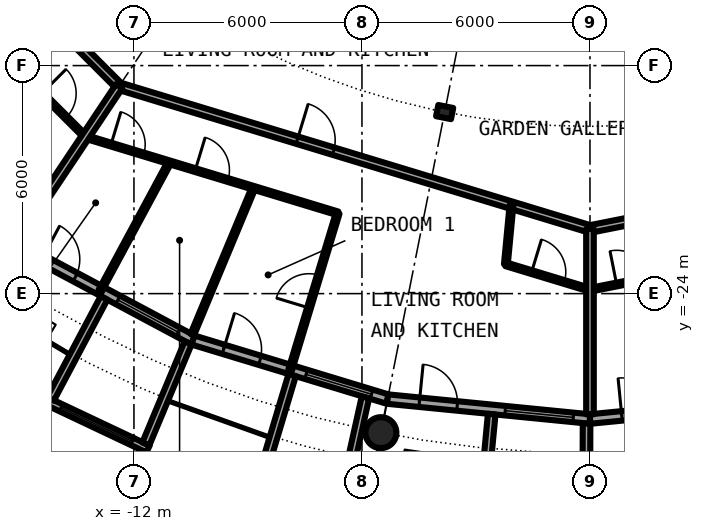
"""IFC4 building model, lengths in metres.
Left out: names, types, materials, properties, quantities, classifications, styles, units other than length and angle.
Written with IfcOpenShell. Run it as: python <this file> out.ifc"""

import sys

from ifc_helpers import new_model, si_unit, direction, frame, frame_2d, origin, origin_2d, place, context, subcontext, project, spatial, rectangle, circle, hollow_circle, i_section, extrude, element, fill, save


model = new_model("IFC4")
c1 = context("Model", 3, precision=1e-05, world=origin(), true_north=direction((0.0, 1.0)))
c2 = subcontext(c1, "Body", "Model", "MODEL_VIEW")
j1 = project(units=[si_unit("LENGTHUNIT", "METRE"), si_unit("PLANEANGLEUNIT", "RADIAN")], contexts=[c1])
p1 = place(None, origin())
s1 = spatial("IfcSite", under=j1, at=p1, CompositionType="ELEMENT")
p2 = place(p1, origin())
s2 = spatial("IfcBuilding", under=s1, at=p2, CompositionType="ELEMENT")
p3 = place(p2, frame((0.0, 0.0, 196.3)))
s3 = spatial("IfcBuildingStorey", under=s2, at=p3, CompositionType="ELEMENT", Elevation=196.3)
p4 = place(p3, frame((-5.501, -27.658, 0.0), z_axis=(0.0, 0.0, 1.0), x_axis=(1.0, 0.0, 0.0)))
e1 = element("IfcColumn", 1, at=p4, inside=s3, PredefinedType="COLUMN", context=c2, shape_type="SweptSolid", body=[
    extrude(hollow_circle(Radius=0.406, WallThickness=0.03, at=origin_2d()), origin(), (0.0, 0.0, 1.0), 3.05),
])
p5 = place(p3, frame((-3.824, -19.223, 0.0), z_axis=(0.0, 0.0, 1.0), x_axis=(-0.195090322016, -0.980785280403, 0.0)))
e2 = element("IfcColumn", 2, at=p5, inside=s3, PredefinedType="COLUMN", context=c2, shape_type="SweptSolid", body=[
    extrude(i_section(OverallWidth=0.3, OverallDepth=0.4, WebThickness=0.013, FlangeThickness=0.024, FilletRadius=0.027, at=origin_2d()), origin(), (0.0, 0.0, 1.0), 3.05),
])
p6 = place(p3, frame((-15.167, -22.699, 0.0), z_axis=(0.0, 0.0, 1.0), x_axis=(0.881915646801, -0.471407246368, 0.0)))
e3 = element("IfcWall", 3, at=p6, inside=s3, PredefinedType="SOLIDWALL", context=c2, shape_type="SweptSolid", body=[
    extrude(rectangle(XDim=5.352, YDim=0.25, at=frame_2d((2.676, 0.0))), origin(), (0.0, 0.0, 1.0), 2.7),
])
p7 = place(p6, frame((0.841, 0.0, 0.0)))
e4 = element("IfcOpeningElement", 4, at=p7, cuts=e3, PredefinedType="OPENING", context=c2, shape_type="SweptSolid", body=[
    extrude(rectangle(XDim=1.0, YDim=2.2, at=frame_2d((0.5, 1.1))), frame((0.0, 0.135, 0.0), z_axis=(0.0, -1.0, 0.0), x_axis=(1.0, 0.0, 0.0)), (0.0, 0.0, 1.0), 0.27),
])
p8 = place(p6, frame((3.111, 0.0, 0.3)))
e5 = element("IfcOpeningElement", 5, at=p8, cuts=e3, PredefinedType="OPENING", context=c2, shape_type="SweptSolid", body=[
    extrude(rectangle(XDim=1.8, YDim=2.1, at=frame_2d((0.9, 1.05))), frame((0.0, 0.135, 0.0), z_axis=(0.0, -1.0, 0.0), x_axis=(1.0, 0.0, 0.0)), (0.0, 0.0, 1.0), 0.27),
])
p9 = place(p3, frame((-14.335, -26.808, -0.03), z_axis=(0.0, 0.0, 1.0), x_axis=(0.904000060331, -0.427532327342, 0.0)))
e6 = element("IfcWall", 6, at=p9, inside=s3, PredefinedType="SOLIDWALL", context=c2, shape_type="SweptSolid", body=[
    extrude(rectangle(XDim=2.993, YDim=0.2, at=frame_2d((1.497, 0.0))), origin(), (0.0, 0.0, 1.0), 2.73),
])
p10 = place(p9, frame((0.457, 0.0, 0.33)))
e7 = element("IfcOpeningElement", 7, at=p10, cuts=e6, PredefinedType="OPENING", context=c2, shape_type="SweptSolid", body=[
    extrude(circle(Radius=1.04, at=frame_2d((1.04, 1.04))), frame((0.0, 0.11, 0.0), z_axis=(0.0, -1.0, 0.0), x_axis=(1.0, 0.0, 0.0)), (0.0, 0.0, 1.0), 0.22),
])
p11 = place(p3, frame((-12.787, -24.113, -0.03), z_axis=(0.0, 0.0, 1.0), x_axis=(-0.468365282436, -0.883534924159, 0.0)))
e8 = element("IfcWall", 8, at=p11, inside=s3, PredefinedType="SOLIDWALL", context=c2, shape_type="SweptSolid", body=[
    extrude(rectangle(XDim=3.006, YDim=0.2, at=frame_2d((1.503, 0.0))), origin(), (0.0, 0.0, 1.0), 2.73),
])
p12 = place(p3, frame((-10.575, -25.295, -0.03), z_axis=(0.0, 0.0, 1.0), x_axis=(-0.385697364644, -0.922625353492, 0.0)))
e9 = element("IfcWall", 9, at=p12, inside=s3, PredefinedType="SOLIDWALL", context=c2, shape_type="SweptSolid", body=[
    extrude(rectangle(XDim=2.883, YDim=0.2, at=frame_2d((1.442, 0.0))), origin(), (0.0, 0.0, 1.0), 2.73),
])
p13 = place(p3, frame((-10.447, -25.222, 0.0), z_axis=(0.0, 0.0, 1.0), x_axis=(0.956965678721, -0.290201119486, 0.0)))
e10 = element("IfcWall", 10, at=p13, inside=s3, PredefinedType="SOLIDWALL", context=c2, shape_type="SweptSolid", body=[
    extrude(rectangle(XDim=5.351, YDim=0.25, at=frame_2d((2.676, 0.0))), origin(), (0.0, 0.0, 1.0), 2.7),
])
p14 = place(p13, frame((0.841, 0.0, 0.0)))
e11 = element("IfcOpeningElement", 11, at=p14, cuts=e10, PredefinedType="OPENING", context=c2, shape_type="SweptSolid", body=[
    extrude(rectangle(XDim=1.0, YDim=2.2, at=frame_2d((0.5, 1.1))), frame((0.0, 0.135, 0.0), z_axis=(0.0, -1.0, 0.0), x_axis=(1.0, 0.0, 0.0)), (0.0, 0.0, 1.0), 0.27),
])
p15 = place(p13, frame((3.111, 0.0, 0.3)))
e12 = element("IfcOpeningElement", 12, at=p15, cuts=e10, PredefinedType="OPENING", context=c2, shape_type="SweptSolid", body=[
    extrude(rectangle(XDim=1.8, YDim=2.1, at=frame_2d((0.9, 1.05))), frame((0.0, 0.135, 0.0), z_axis=(0.0, -1.0, 0.0), x_axis=(1.0, 0.0, 0.0)), (0.0, 0.0, 1.0), 0.27),
])
p16 = place(p3, frame((-7.837, -26.144, -0.03), z_axis=(0.0, 0.0, 1.0), x_axis=(-0.287064767992, -0.957911174889, 0.0)))
e13 = element("IfcWall", 13, at=p16, inside=s3, PredefinedType="SOLIDWALL", context=c2, shape_type="SweptSolid", body=[
    extrude(rectangle(XDim=3.006, YDim=0.2, at=frame_2d((1.503, 0.0))), origin(), (0.0, 0.0, 1.0), 2.73),
])
p17 = place(p3, frame((-5.909, -26.729, -0.03), z_axis=(0.0, 0.0, 1.0), x_axis=(-0.216409053917, -0.976302781612, 0.0)))
e14 = element("IfcWall", 14, at=p17, inside=s3, PredefinedType="SOLIDWALL", context=c2, shape_type="SweptSolid", body=[
    extrude(rectangle(XDim=2.925, YDim=0.2, at=frame_2d((1.463, 0.0))), origin(), (0.0, 0.0, 1.0), 2.73),
])
p18 = place(p3, frame((-5.326, -26.775, 0.0), z_axis=(0.0, 0.0, 1.0), x_axis=(0.995173996315, -0.098126026407, 0.0)))
e15 = element("IfcWall", 15, at=p18, inside=s3, PredefinedType="SOLIDWALL", context=c2, shape_type="SweptSolid", body=[
    extrude(rectangle(XDim=5.352, YDim=0.25, at=frame_2d((2.676, 0.0))), origin(), (0.0, 0.0, 1.0), 2.7),
])
p19 = place(p18, frame((0.841, 0.0, 0.0)))
e16 = element("IfcOpeningElement", 16, at=p19, cuts=e15, PredefinedType="OPENING", context=c2, shape_type="SweptSolid", body=[
    extrude(rectangle(XDim=1.0, YDim=2.2, at=frame_2d((0.5, 1.1))), frame((0.0, 0.135, 0.0), z_axis=(0.0, -1.0, 0.0), x_axis=(1.0, 0.0, 0.0)), (0.0, 0.0, 1.0), 0.27),
])
p20 = place(p18, frame((3.111, 0.0, 0.3)))
e17 = element("IfcOpeningElement", 17, at=p20, cuts=e15, PredefinedType="OPENING", context=c2, shape_type="SweptSolid", body=[
    extrude(rectangle(XDim=1.8, YDim=2.1, at=frame_2d((0.9, 1.05))), frame((0.0, 0.135, 0.0), z_axis=(0.0, -1.0, 0.0), x_axis=(1.0, 0.0, 0.0)), (0.0, 0.0, 1.0), 0.27),
])
p21 = place(p3, frame((-2.586, -27.171, -0.03), z_axis=(0.0, 0.0, 1.0), x_axis=(-0.094548432284, -0.995520262954, 0.0)))
e18 = element("IfcWall", 18, at=p21, inside=s3, PredefinedType="SOLIDWALL", context=c2, shape_type="SweptSolid", body=[
    extrude(rectangle(XDim=3.006, YDim=0.2, at=frame_2d((1.503, 0.0))), origin(), (0.0, 0.0, 1.0), 2.73),
])
p22 = place(p3, frame((-0.09, -27.417, -0.03), z_axis=(0.0, 0.0, 1.0), x_axis=(-0.00347308367, -0.999993968827, 0.0)))
e19 = element("IfcWall", 19, at=p22, inside=s3, PredefinedType="SOLIDWALL", context=c2, shape_type="SweptSolid", body=[
    extrude(rectangle(XDim=2.882, YDim=0.2, at=frame_2d((1.441, 0.0))), origin(), (0.0, 0.0, 1.0), 2.73),
])
p23 = place(p3, frame((0.0, -27.3, 0.0), z_axis=(0.0, 0.0, 1.0), x_axis=(0.995173996315, 0.098126026407, 0.0)))
e20 = element("IfcWall", 20, at=p23, inside=s3, PredefinedType="SOLIDWALL", context=c2, shape_type="SweptSolid", body=[
    extrude(rectangle(XDim=5.352, YDim=0.25, at=frame_2d((2.676, 0.0))), origin(), (0.0, 0.0, 1.0), 2.7),
])
p24 = place(p23, frame((0.841, 0.0, 0.0)))
e21 = element("IfcOpeningElement", 21, at=p24, cuts=e20, PredefinedType="OPENING", context=c2, shape_type="SweptSolid", body=[
    extrude(rectangle(XDim=1.0, YDim=2.2, at=frame_2d((0.5, 1.1))), frame((0.0, 0.135, 0.0), z_axis=(0.0, -1.0, 0.0), x_axis=(1.0, 0.0, 0.0)), (0.0, 0.0, 1.0), 0.27),
])
p25 = place(p23, frame((3.111, 0.0, 0.3)))
e22 = element("IfcOpeningElement", 22, at=p25, cuts=e20, PredefinedType="OPENING", context=c2, shape_type="SweptSolid", body=[
    extrude(rectangle(XDim=1.8, YDim=2.1, at=frame_2d((0.9, 1.05))), frame((0.0, 0.135, 0.0), z_axis=(0.0, -1.0, 0.0), x_axis=(1.0, 0.0, 0.0)), (0.0, 0.0, 1.0), 0.27),
])
p26 = place(p3, frame((-14.927, -18.224, 0.0), z_axis=(0.0, 0.0, 1.0), x_axis=(0.707316201218, -0.706897299114, 0.0)))
e23 = element("IfcWall", 23, at=p26, inside=s3, PredefinedType="PARTITIONING", context=c2, shape_type="SweptSolid", body=[
    extrude(rectangle(XDim=2.331, YDim=0.1, at=frame_2d((1.166, 0.0))), origin(), (0.0, 0.0, 1.0), 2.7),
])
p27 = place(p26, frame((0.716, 0.0, 0.0)))
e24 = element("IfcOpeningElement", 24, at=p27, cuts=e23, PredefinedType="OPENING", context=c2, shape_type="SweptSolid", body=[
    extrude(rectangle(XDim=0.9, YDim=2.3, at=frame_2d((0.45, 1.15))), frame((0.0, 0.06, 0.0), z_axis=(0.0, -1.0, 0.0), x_axis=(1.0, 0.0, 0.0)), (0.0, 0.0, 1.0), 0.12),
])
p28 = place(p3, frame((0.0, -23.9, 0.0), z_axis=(0.0, 0.0, 1.0), x_axis=(0.98079351414, 0.19504892366, 0.0)))
e25 = element("IfcWall", 25, at=p28, inside=s3, PredefinedType="PARTITIONING", context=c2, shape_type="SweptSolid", body=[
    extrude(rectangle(XDim=2.332, YDim=0.1, at=frame_2d((1.166, 0.0))), origin(), (0.0, 0.0, 1.0), 2.7),
])
p29 = place(p28, frame((0.716, 0.0, 0.0)))
e26 = element("IfcOpeningElement", 26, at=p29, cuts=e25, PredefinedType="OPENING", context=c2, shape_type="SweptSolid", body=[
    extrude(rectangle(XDim=0.9, YDim=2.3, at=frame_2d((0.45, 1.15))), frame((0.0, 0.06, 0.0), z_axis=(0.0, -1.0, 0.0), x_axis=(1.0, 0.0, 0.0)), (0.0, 0.0, 1.0), 0.12),
])
p30 = place(p3, frame((-13.279, -19.874, 0.0), z_axis=(0.0, 0.0, 1.0), x_axis=(0.956989789119, -0.290121601266, 0.0)))
e27 = element("IfcWall", 27, at=p30, inside=s3, PredefinedType="PARTITIONING", context=c2, shape_type="SweptSolid", body=[
    extrude(rectangle(XDim=6.942, YDim=0.1, at=frame_2d((3.471, 0.0))), origin(), (0.0, 0.0, 1.0), 2.7),
])
p31 = place(p30, frame((3.022, 0.0, 0.0)))
e28 = element("IfcOpeningElement", 28, at=p31, cuts=e27, PredefinedType="OPENING", context=c2, shape_type="SweptSolid", body=[
    extrude(rectangle(XDim=0.9, YDim=2.3, at=frame_2d((0.45, 1.15))), frame((0.0, 0.06, 0.0), z_axis=(0.0, -1.0, 0.0), x_axis=(1.0, 0.0, 0.0)), (0.0, 0.0, 1.0), 0.12),
])
p32 = place(p30, frame((0.705, 0.0, 0.0)))
e29 = element("IfcOpeningElement", 29, at=p32, cuts=e27, PredefinedType="OPENING", context=c2, shape_type="SweptSolid", body=[
    extrude(rectangle(XDim=0.9, YDim=2.3, at=frame_2d((0.45, 1.15))), frame((0.0, 0.06, 0.0), z_axis=(0.0, -1.0, 0.0), x_axis=(1.0, 0.0, 0.0)), (0.0, 0.0, 1.0), 0.12),
])
p33 = place(p3, frame((-2.213, -23.229, 0.0), z_axis=(0.0, 0.0, 1.0), x_axis=(0.957056340114, -0.289901986622, 0.0)))
e30 = element("IfcWall", 30, at=p33, inside=s3, PredefinedType="PARTITIONING", context=c2, shape_type="SweptSolid", body=[
    extrude(rectangle(XDim=2.314, YDim=0.1, at=frame_2d((1.157, 0.0))), origin(), (0.0, 0.0, 1.0), 2.7),
])
p34 = place(p33, frame((0.707, 0.0, 0.0)))
e31 = element("IfcOpeningElement", 31, at=p34, cuts=e30, PredefinedType="OPENING", context=c2, shape_type="SweptSolid", body=[
    extrude(rectangle(XDim=0.9, YDim=2.3, at=frame_2d((0.45, 1.15))), frame((0.0, 0.06, 0.0), z_axis=(0.0, -1.0, 0.0), x_axis=(1.0, 0.0, 0.0)), (0.0, 0.0, 1.0), 0.12),
])
p35 = place(p3, frame((-18.542, -12.389, 0.0), z_axis=(0.0, 0.0, 1.0), x_axis=(0.707106781187, -0.707106781187, 0.0)))
e32 = element("IfcWall", 32, at=p35, inside=s3, PredefinedType="PARTITIONING", context=c2, shape_type="SweptSolid", body=[
    extrude(rectangle(XDim=8.702, YDim=0.2, at=frame_2d((4.351, 0.0))), origin(), (0.0, 0.0, 1.0), 2.7),
])
p36 = place(p35, frame((2.763, 0.0, 0.0)))
e33 = element("IfcOpeningElement", 33, at=p36, cuts=e32, PredefinedType="OPENING", context=c2, shape_type="SweptSolid", body=[
    extrude(rectangle(XDim=1.0, YDim=2.3, at=frame_2d((0.5, 1.15))), frame((0.0, 0.11, 0.0), z_axis=(0.0, -1.0, 0.0), x_axis=(1.0, 0.0, 0.0)), (0.0, 0.0, 1.0), 0.22),
])
p37 = place(p3, frame((0.0, -22.3, 0.0), z_axis=(0.0, 0.0, 1.0), x_axis=(0.980813117615, 0.194950322682, 0.0)))
e34 = element("IfcWall", 34, at=p37, inside=s3, PredefinedType="PARTITIONING", context=c2, shape_type="SweptSolid", body=[
    extrude(rectangle(XDim=8.7, YDim=0.2, at=frame_2d((4.35, 0.0))), origin(), (0.0, 0.0, 1.0), 2.7),
])
p38 = place(p37, frame((4.938, 0.0, 0.0)))
e35 = element("IfcOpeningElement", 35, at=p38, cuts=e34, PredefinedType="OPENING", context=c2, shape_type="SweptSolid", body=[
    extrude(rectangle(XDim=1.0, YDim=2.3, at=frame_2d((0.5, 1.15))), frame((0.0, 0.11, 0.0), z_axis=(0.0, -1.0, 0.0), x_axis=(1.0, 0.0, 0.0)), (0.0, 0.0, 1.0), 0.22),
])
p39 = place(p3, frame((-12.389, -18.542, 0.0), z_axis=(0.0, 0.0, 1.0), x_axis=(0.956942051091, -0.290279022415, 0.0)))
e36 = element("IfcWall", 36, at=p39, inside=s3, PredefinedType="PARTITIONING", context=c2, shape_type="SweptSolid", body=[
    extrude(rectangle(XDim=12.946, YDim=0.2, at=frame_2d((6.473, 0.0))), origin(), (0.0, 0.0, 1.0), 2.7),
])
p40 = place(p39, frame((4.895, 0.0, 0.0)))
e37 = element("IfcOpeningElement", 37, at=p40, cuts=e36, PredefinedType="OPENING", context=c2, shape_type="SweptSolid", body=[
    extrude(rectangle(XDim=1.0, YDim=2.3, at=frame_2d((0.5, 1.15))), frame((0.0, 0.11, 0.0), z_axis=(0.0, -1.0, 0.0), x_axis=(1.0, 0.0, 0.0)), (0.0, 0.0, 1.0), 0.22),
])
p41 = place(p3, frame((-14.927, -18.224, 0.0), z_axis=(0.0, 0.0, 1.0), x_axis=(0.633861186344, 0.773446828454, 0.0)))
e38 = element("IfcWall", 38, at=p41, inside=s3, PredefinedType="PARTITIONING", context=c2, shape_type="SweptSolid", body=[
    extrude(rectangle(XDim=1.578, YDim=0.1, at=frame_2d((0.789, 0.0))), origin(), (0.0, 0.0, 1.0), 2.7),
])
p42 = place(p3, frame((-15.096, -22.596, 0.0), z_axis=(0.0, 0.0, 1.0), x_axis=(0.55555521993, 0.831479643532, 0.0)))
e39 = element("IfcWall", 39, at=p42, inside=s3, PredefinedType="PARTITIONING", context=c2, shape_type="SweptSolid", body=[
    extrude(rectangle(XDim=4.875, YDim=0.2, at=frame_2d((2.437, 0.0))), origin(), (0.0, 0.0, 1.0), 2.7),
])
p43 = place(p3, frame((-12.887, -23.925, 0.0), z_axis=(0.0, 0.0, 1.0), x_axis=(0.474281720599, 0.88037313084, 0.0)))
e40 = element("IfcWall", 40, at=p43, inside=s3, PredefinedType="PARTITIONING", context=c2, shape_type="SweptSolid", body=[
    extrude(rectangle(XDim=3.842, YDim=0.1, at=frame_2d((1.921, 0.0))), origin(), (0.0, 0.0, 1.0), 2.7),
])
p44 = place(p3, frame((-10.465, -25.079, 0.0), z_axis=(0.0, 0.0, 1.0), x_axis=(0.385232176411, 0.922819684585, 0.0)))
e41 = element("IfcWall", 41, at=p44, inside=s3, PredefinedType="PARTITIONING", context=c2, shape_type="SweptSolid", body=[
    extrude(rectangle(XDim=4.187, YDim=0.1, at=frame_2d((2.094, 0.0))), origin(), (0.0, 0.0, 1.0), 2.7),
])
p45 = place(p3, frame((-7.888, -26.005, 0.0), z_axis=(0.0, 0.0, 1.0), x_axis=(0.290193157742, 0.956968093094, 0.0)))
e42 = element("IfcWall", 42, at=p45, inside=s3, PredefinedType="PARTITIONING", context=c2, shape_type="SweptSolid", body=[
    extrude(rectangle(XDim=4.304, YDim=0.1, at=frame_2d((2.152, 0.0))), origin(), (0.0, 0.0, 1.0), 2.7),
])
p46 = place(p45, frame((1.702, 0.0, 0.0)))
e43 = element("IfcOpeningElement", 43, at=p46, cuts=e42, PredefinedType="OPENING", context=c2, shape_type="SweptSolid", body=[
    extrude(rectangle(XDim=0.9, YDim=2.3, at=frame_2d((0.45, 1.15))), frame((0.0, 0.06, 0.0), z_axis=(0.0, -1.0, 0.0), x_axis=(1.0, 0.0, 0.0)), (0.0, 0.0, 1.0), 0.12),
])
p47 = place(p3, frame((-2.213, -23.229, 0.0), z_axis=(0.0, 0.0, 1.0), x_axis=(0.094720578196, 0.995503898569, 0.0)))
e44 = element("IfcWall", 44, at=p47, inside=s3, PredefinedType="PARTITIONING", context=c2, shape_type="SweptSolid", body=[
    extrude(rectangle(XDim=1.562, YDim=0.1, at=frame_2d((0.781, 0.0))), origin(), (0.0, 0.0, 1.0), 2.7),
])
p48 = place(p3, frame((0.0, -27.175, 0.0), z_axis=(0.0, 0.0, 1.0), x_axis=(0.0, 1.0, 0.0)))
e45 = element("IfcWall", 45, at=p48, inside=s3, PredefinedType="PARTITIONING", context=c2, shape_type="SweptSolid", body=[
    extrude(rectangle(XDim=4.875, YDim=0.2, at=frame_2d((2.438, 0.0))), origin(), (0.0, 0.0, 1.0), 2.7),
])
p49 = place(p7, origin())
e46 = element("IfcDoor", 46, at=p49, inside=s3, OperationType="SINGLE_SWING_LEFT", PredefinedType="DOOR", context=c2, shape_type="SweptSolid", body=[
    extrude(rectangle(XDim=1.0, YDim=2.2, at=frame_2d((0.5, 1.1))), frame((0.0, 0.025, 0.0), z_axis=(0.0, -1.0, 0.0), x_axis=(1.0, 0.0, 0.0)), (0.0, 0.0, 1.0), 0.05),
])
fill(e4, e46)
p50 = place(p8, origin())
e47 = element("IfcWindow", 47, at=p50, inside=s3, PartitioningType="SINGLE_PANEL", PredefinedType="WINDOW", context=c2, shape_type="SweptSolid", body=[
    extrude(rectangle(XDim=1.8, YDim=2.1, at=frame_2d((0.9, 1.05))), frame((0.0, 0.03, 0.0), z_axis=(0.0, -1.0, 0.0), x_axis=(1.0, 0.0, 0.0)), (0.0, 0.0, 1.0), 0.06),
])
fill(e5, e47)
p51 = place(p10, origin())
e48 = element("IfcWindow", 48, at=p51, inside=s3, PartitioningType="SINGLE_PANEL", PredefinedType="WINDOW", context=c2, shape_type="SweptSolid", body=[
    extrude(circle(Radius=1.04, at=frame_2d((1.04, 1.04))), frame((0.0, 0.03, 0.0), z_axis=(0.0, -1.0, 0.0), x_axis=(1.0, 0.0, 0.0)), (0.0, 0.0, 1.0), 0.06),
])
fill(e7, e48)
p52 = place(p14, origin())
e49 = element("IfcDoor", 49, at=p52, inside=s3, OperationType="SINGLE_SWING_LEFT", PredefinedType="DOOR", context=c2, shape_type="SweptSolid", body=[
    extrude(rectangle(XDim=1.0, YDim=2.2, at=frame_2d((0.5, 1.1))), frame((0.0, 0.025, 0.0), z_axis=(0.0, -1.0, 0.0), x_axis=(1.0, 0.0, 0.0)), (0.0, 0.0, 1.0), 0.05),
])
fill(e11, e49)
p53 = place(p15, origin())
e50 = element("IfcWindow", 50, at=p53, inside=s3, PartitioningType="SINGLE_PANEL", PredefinedType="WINDOW", context=c2, shape_type="SweptSolid", body=[
    extrude(rectangle(XDim=1.8, YDim=2.1, at=frame_2d((0.9, 1.05))), frame((0.0, 0.03, 0.0), z_axis=(0.0, -1.0, 0.0), x_axis=(1.0, 0.0, 0.0)), (0.0, 0.0, 1.0), 0.06),
])
fill(e12, e50)
p54 = place(p19, origin())
e51 = element("IfcDoor", 51, at=p54, inside=s3, OperationType="SINGLE_SWING_LEFT", PredefinedType="DOOR", context=c2, shape_type="SweptSolid", body=[
    extrude(rectangle(XDim=1.0, YDim=2.2, at=frame_2d((0.5, 1.1))), frame((0.0, 0.025, 0.0), z_axis=(0.0, -1.0, 0.0), x_axis=(1.0, 0.0, 0.0)), (0.0, 0.0, 1.0), 0.05),
])
fill(e16, e51)
p55 = place(p20, origin())
e52 = element("IfcWindow", 52, at=p55, inside=s3, PartitioningType="SINGLE_PANEL", PredefinedType="WINDOW", context=c2, shape_type="SweptSolid", body=[
    extrude(rectangle(XDim=1.8, YDim=2.1, at=frame_2d((0.9, 1.05))), frame((0.0, 0.03, 0.0), z_axis=(0.0, -1.0, 0.0), x_axis=(1.0, 0.0, 0.0)), (0.0, 0.0, 1.0), 0.06),
])
fill(e17, e52)
p56 = place(p24, origin())
e53 = element("IfcDoor", 53, at=p56, inside=s3, OperationType="SINGLE_SWING_LEFT", PredefinedType="DOOR", context=c2, shape_type="SweptSolid", body=[
    extrude(rectangle(XDim=1.0, YDim=2.2, at=frame_2d((0.5, 1.1))), frame((0.0, 0.025, 0.0), z_axis=(0.0, -1.0, 0.0), x_axis=(1.0, 0.0, 0.0)), (0.0, 0.0, 1.0), 0.05),
])
fill(e21, e53)
p57 = place(p27, origin())
e54 = element("IfcDoor", 54, at=p57, inside=s3, OperationType="SINGLE_SWING_LEFT", PredefinedType="DOOR", context=c2, shape_type="SweptSolid", body=[
    extrude(rectangle(XDim=0.9, YDim=2.3, at=frame_2d((0.45, 1.15))), frame((0.0, 0.025, 0.0), z_axis=(0.0, -1.0, 0.0), x_axis=(1.0, 0.0, 0.0)), (0.0, 0.0, 1.0), 0.05),
])
fill(e24, e54)
p58 = place(p40, origin())
e55 = element("IfcDoor", 55, at=p58, inside=s3, OperationType="SINGLE_SWING_LEFT", PredefinedType="DOOR", context=c2, shape_type="SweptSolid", body=[
    extrude(rectangle(XDim=1.0, YDim=2.3, at=frame_2d((0.5, 1.15))), frame((0.0, 0.025, 0.0), z_axis=(0.0, -1.0, 0.0), x_axis=(1.0, 0.0, 0.0)), (0.0, 0.0, 1.0), 0.05),
])
fill(e37, e55)
p59 = place(p34, origin())
e56 = element("IfcDoor", 56, at=p59, inside=s3, OperationType="SINGLE_SWING_LEFT", PredefinedType="DOOR", context=c2, shape_type="SweptSolid", body=[
    extrude(rectangle(XDim=0.9, YDim=2.3, at=frame_2d((0.45, 1.15))), frame((0.0, 0.025, 0.0), z_axis=(0.0, -1.0, 0.0), x_axis=(1.0, 0.0, 0.0)), (0.0, 0.0, 1.0), 0.05),
])
fill(e31, e56)
p60 = place(p46, origin())
e57 = element("IfcDoor", 57, at=p60, inside=s3, OperationType="SINGLE_SWING_LEFT", PredefinedType="DOOR", context=c2, shape_type="SweptSolid", body=[
    extrude(rectangle(XDim=0.9, YDim=2.3, at=frame_2d((0.45, 1.15))), frame((0.0, 0.025, 0.0), z_axis=(0.0, -1.0, 0.0), x_axis=(1.0, 0.0, 0.0)), (0.0, 0.0, 1.0), 0.05),
])
fill(e43, e57)
p61 = place(p31, origin())
e58 = element("IfcDoor", 58, at=p61, inside=s3, OperationType="SINGLE_SWING_RIGHT", PredefinedType="DOOR", context=c2, shape_type="SweptSolid", body=[
    extrude(rectangle(XDim=0.9, YDim=2.3, at=frame_2d((0.45, 1.15))), frame((0.0, 0.025, 0.0), z_axis=(0.0, -1.0, 0.0), x_axis=(1.0, 0.0, 0.0)), (0.0, 0.0, 1.0), 0.05),
])
fill(e28, e58)
p62 = place(p32, origin())
e59 = element("IfcDoor", 59, at=p62, inside=s3, OperationType="SINGLE_SWING_LEFT", PredefinedType="DOOR", context=c2, shape_type="SweptSolid", body=[
    extrude(rectangle(XDim=0.9, YDim=2.3, at=frame_2d((0.45, 1.15))), frame((0.0, 0.025, 0.0), z_axis=(0.0, -1.0, 0.0), x_axis=(1.0, 0.0, 0.0)), (0.0, 0.0, 1.0), 0.05),
])
fill(e29, e59)
p63 = place(p29, origin())
e60 = element("IfcDoor", 60, at=p63, inside=s3, OperationType="SINGLE_SWING_LEFT", PredefinedType="DOOR", context=c2, shape_type="SweptSolid", body=[
    extrude(rectangle(XDim=0.9, YDim=2.3, at=frame_2d((0.45, 1.15))), frame((0.0, 0.025, 0.0), z_axis=(0.0, -1.0, 0.0), x_axis=(1.0, 0.0, 0.0)), (0.0, 0.0, 1.0), 0.05),
])
fill(e26, e60)
save(model, sys.argv[1])
